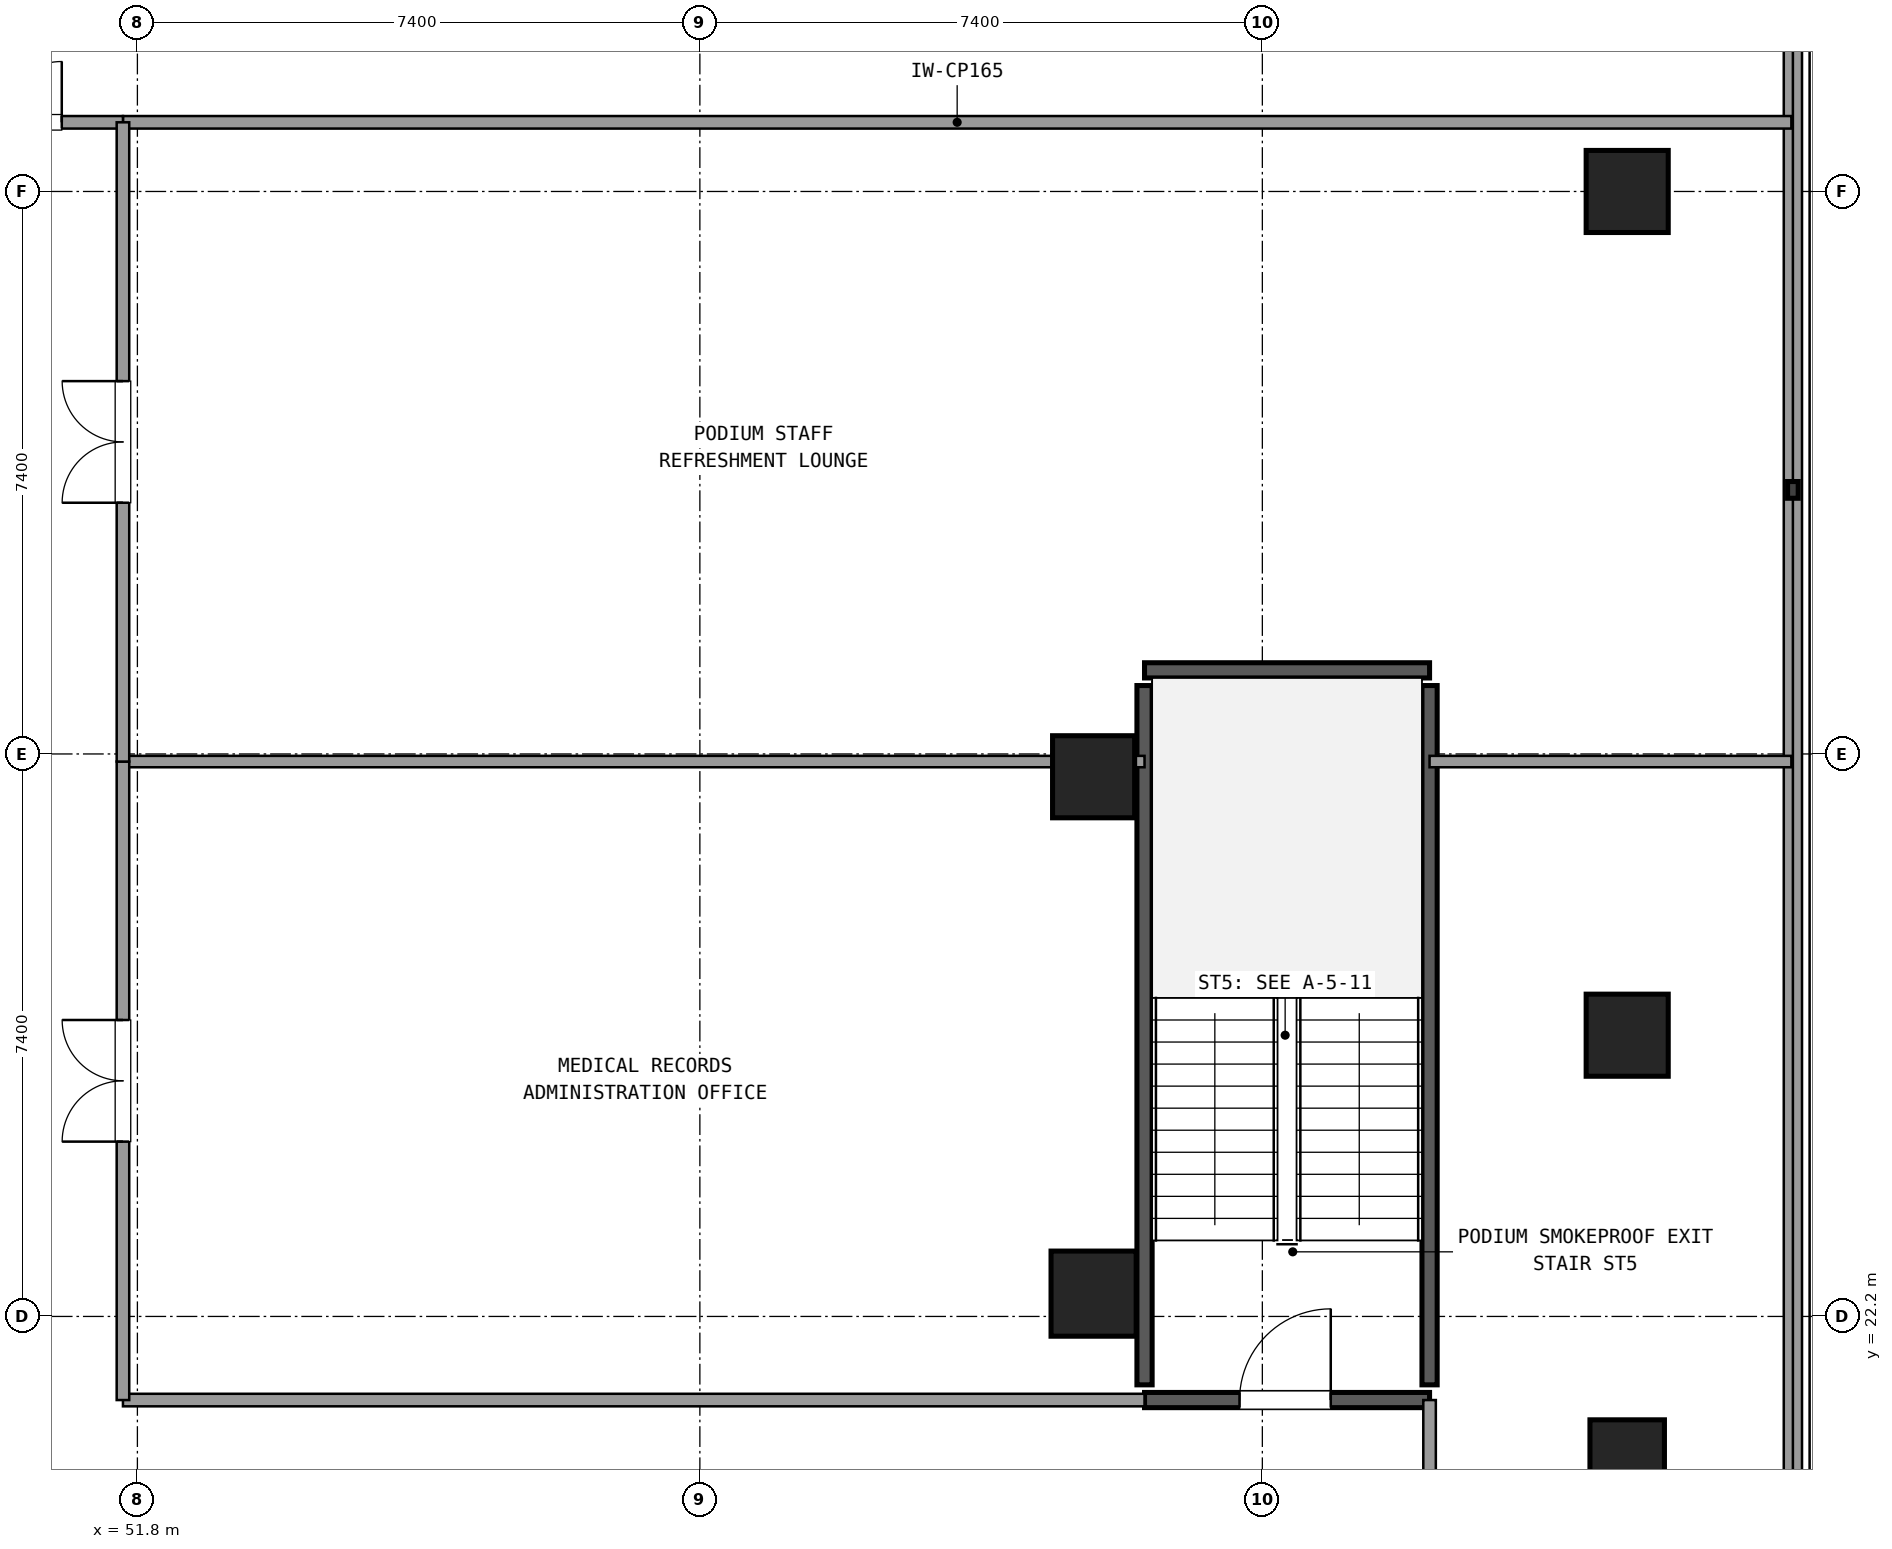
"""IFC4 building model, lengths in metres.
Left out: names, types, materials, properties, quantities, classifications, styles, units other than length and angle.
Written with IfcOpenShell. Run it as: python <this file> out.ifc"""

import sys

from ifc_helpers import new_model, si_unit, direction, frame, frame_2d, origin, origin_2d, place, context, subcontext, project, spatial, rectangle, circle, extrude, element, fill, save


model = new_model("IFC4")
c1 = context("Model", 3, precision=1e-05, world=origin(), true_north=direction((0.0, 1.0)))
c2 = subcontext(c1, "Body", "Model", "MODEL_VIEW")
j1 = project(units=[si_unit("LENGTHUNIT", "METRE"), si_unit("PLANEANGLEUNIT", "RADIAN")], contexts=[c1])
p1 = place(None, origin())
s1 = spatial("IfcSite", under=j1, at=p1, CompositionType="ELEMENT")
p2 = place(p1, origin())
s2 = spatial("IfcBuilding", under=s1, at=p2, CompositionType="ELEMENT")
p3 = place(p2, frame((0.0, 0.0, 5.4)))
s3 = spatial("IfcBuildingStorey", under=s2, at=p3, CompositionType="ELEMENT", Elevation=5.4)
p4 = place(p3, frame((64.38, 22.5, 0.0), z_axis=(0.0, 0.0, 1.0), x_axis=(1.0, 0.0, 0.0)))
e1 = element("IfcColumn", 1, at=p4, inside=s3, PredefinedType="COLUMN", context=c2, shape_type="SweptSolid", body=[
    extrude(circle(Radius=0.56, at=origin_2d()), origin(), (0.0, 0.0, 1.0), 4.5),
])
for number, where, z_axis, x_axis in (
    (2, (64.38, 29.3, 0.0), (0.0, 0.0, 1.0), (1.0, 0.0, 0.0)),
    (3, (71.4, 25.9, 0.0), (0.0, 0.0, 1.0), (1.0, 0.0, 0.0)),
    (4, (71.4, 37.0, 0.0), (0.0, 0.0, 1.0), (1.0, 0.0, 0.0)),
):
    element("IfcColumn", number, at=place(p3, frame(where, z_axis=z_axis, x_axis=x_axis)), inside=s3, PredefinedType="COLUMN", context=c2, shape_type="SweptSolid", body=[
        extrude(rectangle(XDim=1.08, YDim=1.08, at=origin_2d()), origin(), (0.0, 0.0, 1.0), 4.5),
    ])
p5 = place(p3, frame((71.4, 20.35, 0.0), z_axis=(0.0, 0.0, 1.0), x_axis=(1.0, 0.0, 0.0)))
e5 = element("IfcColumn", 5, at=p5, inside=s3, PredefinedType="PILASTER", context=c2, shape_type="SweptSolid", body=[
    extrude(circle(Radius=0.49, at=origin_2d()), origin(), (0.0, 0.0, 1.0), 4.5),
])
p6 = place(p3, frame((73.58, 4.379, 0.0), z_axis=(0.0, 0.0, 1.0), x_axis=(0.0, 1.0, 0.0)))
e6 = element("IfcWall", 6, at=p6, inside=s3, PredefinedType="SOLIDWALL", context=c2, shape_type="SweptSolid", body=[
    extrude(rectangle(XDim=43.042, YDim=0.24, at=frame_2d((21.521, 0.0))), origin(), (0.0, 0.0, 1.0), 0.85),
])
p7 = place(p3, frame((65.05, 21.1, 0.0), z_axis=(0.0, 0.0, 1.0), x_axis=(1.0, 0.0, 0.0)))
e7 = element("IfcWall", 7, at=p7, inside=s3, PredefinedType="SHEAR", context=c2, shape_type="SweptSolid", body=[
    extrude(rectangle(XDim=3.75, YDim=0.2, at=frame_2d((1.875, 0.0))), origin(), (0.0, 0.0, 1.0), 4.2),
])
p8 = place(p7, frame((1.25, 0.0, 0.0)))
e8 = element("IfcOpeningElement", 8, at=p8, cuts=e7, PredefinedType="OPENING", context=c2, shape_type="SweptSolid", body=[
    extrude(rectangle(XDim=1.2, YDim=2.15, at=frame_2d((0.6, 1.075))), frame((0.0, 0.11, 0.0), z_axis=(0.0, -1.0, 0.0), x_axis=(1.0, 0.0, 0.0)), (0.0, 0.0, 1.0), 0.22),
])
p9 = place(p3, frame((65.05, 30.7, 0.0), z_axis=(0.0, 0.0, 1.0), x_axis=(1.0, 0.0, 0.0)))
e9 = element("IfcWall", 9, at=p9, inside=s3, PredefinedType="SHEAR", context=c2, shape_type="SweptSolid", body=[
    extrude(rectangle(XDim=3.75, YDim=0.2, at=frame_2d((1.875, 0.0))), origin(), (0.0, 0.0, 1.0), 4.2),
])
for number, where, z_axis, x_axis in (
    (10, (65.05, 21.3, 0.0), (0.0, 0.0, 1.0), (0.0, 1.0, 0.0)),
    (11, (68.8, 21.3, 0.0), (0.0, 0.0, 1.0), (0.0, 1.0, 0.0)),
):
    element("IfcWall", number, at=place(p3, frame(where, z_axis=z_axis, x_axis=x_axis)), inside=s3, PredefinedType="SHEAR", context=c2, shape_type="SweptSolid", body=[
        extrude(rectangle(XDim=9.2, YDim=0.2, at=frame_2d((4.6, 0.0))), origin(), (0.0, 0.0, 1.0), 4.2),
    ])
p10 = place(p3, frame((51.61, 37.91, 0.0), z_axis=(0.0, 0.0, 1.0), x_axis=(1.0, 0.0, 0.0)))
e12 = element("IfcWall", 12, at=p10, inside=s3, PredefinedType="PARTITIONING", context=c2, shape_type="SweptSolid", body=[
    extrude(rectangle(XDim=21.95, YDim=0.165, at=frame_2d((10.975, 0.0))), origin(), (0.0, 0.0, 1.0), 3.21),
])
p11 = place(p3, frame((68.8, 18.17, 0.0), z_axis=(0.0, 0.0, 1.0), x_axis=(0.0, 1.0, 0.0)))
e13 = element("IfcWall", 13, at=p11, inside=s3, PredefinedType="PARTITIONING", context=c2, shape_type="SweptSolid", body=[
    extrude(rectangle(XDim=2.93, YDim=0.165, at=frame_2d((1.465, 0.0))), origin(), (0.0, 0.0, 1.0), 3.21),
])
p12 = place(p3, frame((51.61, 21.1, 0.0), z_axis=(0.0, 0.0, 1.0), x_axis=(1.0, 0.0, 0.0)))
e14 = element("IfcWall", 14, at=p12, inside=s3, PredefinedType="PARTITIONING", context=c2, shape_type="SweptSolid", body=[
    extrude(rectangle(XDim=13.44, YDim=0.165, at=frame_2d((6.72, 0.0))), origin(), (0.0, 0.0, 1.0), 3.21),
])
p13 = place(p3, frame((48.4, 37.91, 0.0), z_axis=(0.0, 0.0, 1.0), x_axis=(1.0, 0.0, 0.0)))
e15 = element("IfcWall", 15, at=p13, inside=s3, PredefinedType="PARTITIONING", context=c2, shape_type="SweptSolid", body=[
    extrude(rectangle(XDim=3.21, YDim=0.165, at=frame_2d((1.605, 0.0))), origin(), (0.0, 0.0, 1.0), 3.21),
])
p14 = place(p13, frame((0.805, 0.0, 0.0)))
e16 = element("IfcOpeningElement", 16, at=p14, cuts=e15, PredefinedType="OPENING", context=c2, shape_type="SweptSolid", body=[
    extrude(rectangle(XDim=1.6, YDim=2.2, at=frame_2d((0.8, 1.1))), frame((0.0, 0.093, 0.0), z_axis=(0.0, -1.0, 0.0), x_axis=(1.0, 0.0, 0.0)), (0.0, 0.0, 1.0), 0.185),
])
p15 = place(p3, frame((51.61, 29.5, 0.0), z_axis=(0.0, 0.0, 1.0), x_axis=(1.0, 0.0, 0.0)))
e17 = element("IfcWall", 17, at=p15, inside=s3, PredefinedType="PARTITIONING", context=c2, shape_type="SweptSolid", body=[
    extrude(rectangle(XDim=13.44, YDim=0.15, at=frame_2d((6.72, 0.0))), origin(), (0.0, 0.0, 1.0), 3.21),
])
p16 = place(p3, frame((68.8, 29.5, 0.0), z_axis=(0.0, 0.0, 1.0), x_axis=(1.0, 0.0, 0.0)))
e18 = element("IfcWall", 18, at=p16, inside=s3, PredefinedType="PARTITIONING", context=c2, shape_type="SweptSolid", body=[
    extrude(rectangle(XDim=4.76, YDim=0.15, at=frame_2d((2.38, 0.0))), origin(), (0.0, 0.0, 1.0), 3.21),
])
p17 = place(p3, frame((51.61, 21.1, 0.0), z_axis=(0.0, 0.0, 1.0), x_axis=(0.0, 1.0, 0.0)))
e19 = element("IfcWall", 19, at=p17, inside=s3, PredefinedType="PARTITIONING", context=c2, shape_type="SweptSolid", body=[
    extrude(rectangle(XDim=8.4, YDim=0.165, at=frame_2d((4.2, 0.0))), origin(), (0.0, 0.0, 1.0), 3.21),
])
p18 = place(p17, frame((3.4, 0.0, 0.0)))
e20 = element("IfcOpeningElement", 20, at=p18, cuts=e19, PredefinedType="OPENING", context=c2, shape_type="SweptSolid", body=[
    extrude(rectangle(XDim=1.6, YDim=2.2, at=frame_2d((0.8, 1.1))), frame((0.0, 0.093, 0.0), z_axis=(0.0, -1.0, 0.0), x_axis=(1.0, 0.0, 0.0)), (0.0, 0.0, 1.0), 0.185),
])
p19 = place(p3, frame((51.61, 29.5, 0.0), z_axis=(0.0, 0.0, 1.0), x_axis=(0.0, 1.0, 0.0)))
e21 = element("IfcWall", 21, at=p19, inside=s3, PredefinedType="PARTITIONING", context=c2, shape_type="SweptSolid", body=[
    extrude(rectangle(XDim=8.41, YDim=0.165, at=frame_2d((4.205, 0.0))), origin(), (0.0, 0.0, 1.0), 3.21),
])
p20 = place(p19, frame((3.405, 0.0, 0.0)))
e22 = element("IfcOpeningElement", 22, at=p20, cuts=e21, PredefinedType="OPENING", context=c2, shape_type="SweptSolid", body=[
    extrude(rectangle(XDim=1.6, YDim=2.2, at=frame_2d((0.8, 1.1))), frame((0.0, 0.093, 0.0), z_axis=(0.0, -1.0, 0.0), x_axis=(1.0, 0.0, 0.0)), (0.0, 0.0, 1.0), 0.185),
])
p21 = place(p8, origin())
e23 = element("IfcDoor", 23, at=p21, inside=s3, OperationType="SINGLE_SWING_RIGHT", PredefinedType="DOOR", context=c2, shape_type="SweptSolid", body=[
    extrude(rectangle(XDim=1.2, YDim=2.15, at=frame_2d((0.6, 1.075))), frame((0.0, 0.025, 0.0), z_axis=(0.0, -1.0, 0.0), x_axis=(1.0, 0.0, 0.0)), (0.0, 0.0, 1.0), 0.05),
])
fill(e8, e23)
p22 = place(p14, origin())
e24 = element("IfcDoor", 24, at=p22, inside=s3, OperationType="DOUBLE_DOOR_SINGLE_SWING", PredefinedType="DOOR", context=c2, shape_type="SweptSolid", body=[
    extrude(rectangle(XDim=1.6, YDim=2.2, at=frame_2d((0.8, 1.1))), frame((0.0, 0.025, 0.0), z_axis=(0.0, -1.0, 0.0), x_axis=(1.0, 0.0, 0.0)), (0.0, 0.0, 1.0), 0.05),
])
fill(e16, e24)
p23 = place(p18, origin())
e25 = element("IfcDoor", 25, at=p23, inside=s3, OperationType="DOUBLE_DOOR_SINGLE_SWING", PredefinedType="DOOR", context=c2, shape_type="SweptSolid", body=[
    extrude(rectangle(XDim=1.6, YDim=2.2, at=frame_2d((0.8, 1.1))), frame((0.0, 0.025, 0.0), z_axis=(0.0, -1.0, 0.0), x_axis=(1.0, 0.0, 0.0)), (0.0, 0.0, 1.0), 0.05),
])
fill(e20, e25)
p24 = place(p20, origin())
e26 = element("IfcDoor", 26, at=p24, inside=s3, OperationType="DOUBLE_DOOR_SINGLE_SWING", PredefinedType="DOOR", context=c2, shape_type="SweptSolid", body=[
    extrude(rectangle(XDim=1.6, YDim=2.2, at=frame_2d((0.8, 1.1))), frame((0.0, 0.025, 0.0), z_axis=(0.0, -1.0, 0.0), x_axis=(1.0, 0.0, 0.0)), (0.0, 0.0, 1.0), 0.05),
])
fill(e22, e26)
save(model, sys.argv[1])
